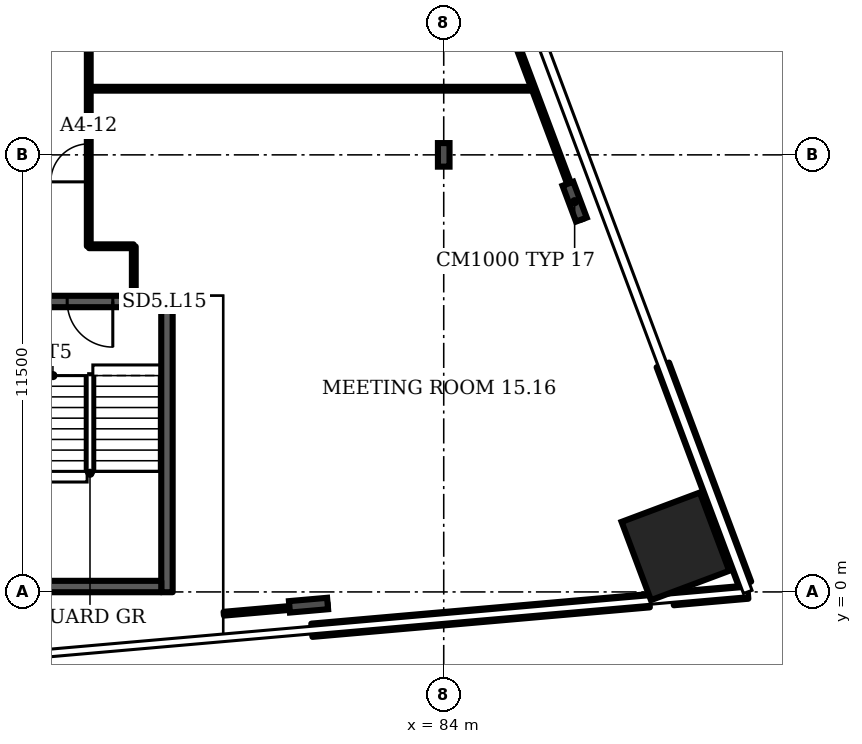
"""IFC4 building model, lengths in metres.
Left out: names, types, materials, properties, quantities, classifications, styles, units other than length and angle.
Written with IfcOpenShell. Run it as: python <this file> out.ifc"""

import sys

from ifc_helpers import new_model, si_unit, direction, frame, frame_2d, origin, origin_2d, place, context, subcontext, project, spatial, rectangle, i_section, extrude, element, fill, save


model = new_model("IFC4")
c1 = context("Model", 3, precision=1e-05, world=origin(), true_north=direction((0.0, 1.0)))
c2 = subcontext(c1, "Body", "Model", "MODEL_VIEW")
j1 = project(units=[si_unit("LENGTHUNIT", "METRE"), si_unit("PLANEANGLEUNIT", "RADIAN")], contexts=[c1])
p1 = place(None, origin())
s1 = spatial("IfcSite", under=j1, at=p1, CompositionType="ELEMENT")
p2 = place(p1, origin())
s2 = spatial("IfcBuilding", under=s1, at=p2, CompositionType="ELEMENT")
p3 = place(p2, frame((0.0, 0.0, 73.9)))
s3 = spatial("IfcBuildingStorey", under=s2, at=p3, CompositionType="ELEMENT", Elevation=73.9)
p4 = place(p3, frame((90.096, 1.2, 0.0), z_axis=(0.0, 0.0, 1.0), x_axis=(-0.351123, 0.936328, 0.0)))
e1 = element("IfcColumn", 1, at=p4, inside=s3, PredefinedType="COLUMN", context=c2, shape_type="SweptSolid", body=[
    extrude(rectangle(XDim=2.2, YDim=2.2, at=origin_2d()), origin(), (0.0, 0.0, 1.0), 3.6),
])
for number, where, z_axis, x_axis in (
    (2, (80.442, -0.349, 0.0), (0.0, 0.0, 1.0), (0.087, -0.996, 0.0)),
    (3, (87.445, 10.268, 0.0), (0.0, 0.0, 1.0), (0.936, 0.351, 0.0)),
):
    element("IfcColumn", number, at=place(p3, frame(where, z_axis=z_axis, x_axis=x_axis)), inside=s3, PredefinedType="COLUMN", context=c2, shape_type="SweptSolid", body=[
        extrude(i_section(OverallWidth=0.302, OverallDepth=1.008, WebThickness=0.021, FlangeThickness=0.04, FilletRadius=0.03, at=origin_2d()), origin(), (0.0, 0.0, 1.0), 3.6),
    ])
p5 = place(p3, frame((84.0, 11.5, 0.0), z_axis=(0.0, 0.0, 1.0), x_axis=(1.0, 0.0, 0.0)))
e4 = element("IfcColumn", 4, at=p5, inside=s3, PredefinedType="COLUMN", context=c2, shape_type="SweptSolid", body=[
    extrude(i_section(OverallWidth=0.305, OverallDepth=0.62, WebThickness=0.021, FlangeThickness=0.04, FilletRadius=0.027, at=origin_2d()), origin(), (0.0, 0.0, 1.0), 3.6),
])
p6 = place(p3, frame((80.53, -1.009, 0.0), z_axis=(0.0, 0.0, 1.0), x_axis=(0.996198, 0.087169, 0.0)))
e5 = element("IfcWall", 5, at=p6, inside=s3, PredefinedType="SOLIDWALL", context=c2, shape_type="SweptSolid", body=[
    extrude(rectangle(XDim=8.912, YDim=0.35, at=frame_2d((4.456, 0.0))), origin(), (0.0, 0.0, 1.0), 1.0),
])
p7 = place(p3, frame((90.039, -0.177, 0.0), z_axis=(0.0, 0.0, 1.0), x_axis=(0.996193, 0.08717, 0.0)))
e6 = element("IfcWall", 6, at=p7, inside=s3, PredefinedType="SOLIDWALL", context=c2, shape_type="SweptSolid", body=[
    extrude(rectangle(XDim=1.969, YDim=0.35, at=frame_2d((0.984, 0.0))), origin(), (0.0, 0.0, 1.0), 1.0),
])
p8 = place(p3, frame((91.926, 0.211, 0.0), z_axis=(0.0, 0.0, 1.0), x_axis=(-0.351118, 0.936328, 0.0)))
e7 = element("IfcWall", 7, at=p8, inside=s3, PredefinedType="SOLIDWALL", context=c2, shape_type="SweptSolid", body=[
    extrude(rectangle(XDim=6.154, YDim=0.35, at=frame_2d((3.077, 0.0))), origin(), (0.0, 0.0, 1.0), 1.0),
])
p9 = place(p3, frame((72.518, 7.642, 0.0), z_axis=(0.0, 0.0, 1.0), x_axis=(1.0, 0.0, 0.0)))
e8 = element("IfcWall", 8, at=p9, inside=s3, PredefinedType="SHEAR", context=c2, shape_type="SweptSolid", body=[
    extrude(rectangle(XDim=4.35, YDim=0.3, at=frame_2d((2.175, 0.0))), origin(), (0.0, 0.0, 1.0), 3.2),
])
p10 = place(p9, frame((1.575, 0.0, 0.0)))
e9 = element("IfcOpeningElement", 9, at=p10, cuts=e8, PredefinedType="OPENING", context=c2, shape_type="SweptSolid", body=[
    extrude(rectangle(XDim=1.2, YDim=2.1, at=frame_2d((0.6, 1.05))), frame((0.0, 0.16, 0.0), z_axis=(0.0, -1.0, 0.0), x_axis=(1.0, 0.0, 0.0)), (0.0, 0.0, 1.0), 0.32),
])
p11 = place(p3, frame((74.66, 9.095, 0.0), z_axis=(0.0, 0.0, 1.0), x_axis=(0.0, 1.0, 0.0)))
e10 = element("IfcWall", 10, at=p11, inside=s3, PredefinedType="PARTITIONING", context=c2, shape_type="SweptSolid", body=[
    extrude(rectangle(XDim=14.23, YDim=0.1, at=frame_2d((7.115, 0.0))), origin(), (0.0, 0.0, 1.0), 3.2),
])
p12 = place(p11, frame((1.695, 0.0, 0.0)))
e11 = element("IfcOpeningElement", 11, at=p12, cuts=e10, PredefinedType="OPENING", context=c2, shape_type="SweptSolid", body=[
    extrude(rectangle(XDim=1.0, YDim=2.1, at=frame_2d((0.5, 1.05))), frame((0.0, 0.06, 0.0), z_axis=(0.0, -1.0, 0.0), x_axis=(1.0, 0.0, 0.0)), (0.0, 0.0, 1.0), 0.12),
])
p13 = place(p11, frame((7.965, 0.0, 0.0)))
e12 = element("IfcOpeningElement", 12, at=p13, cuts=e10, PredefinedType="OPENING", context=c2, shape_type="SweptSolid", body=[
    extrude(rectangle(XDim=1.0, YDim=2.1, at=frame_2d((0.5, 1.05))), frame((0.0, 0.06, 0.0), z_axis=(0.0, -1.0, 0.0), x_axis=(1.0, 0.0, 0.0)), (0.0, 0.0, 1.0), 0.12),
])
p14 = place(p3, frame((74.665, 9.095, 0.0), z_axis=(0.0, 0.0, 1.0), x_axis=(1.0, 0.0, 0.0)))
e13 = element("IfcWall", 13, at=p14, inside=s3, PredefinedType="PARTITIONING", context=c2, shape_type="SweptSolid", body=[
    extrude(rectangle(XDim=1.175, YDim=0.1, at=frame_2d((0.587, 0.0))), origin(), (0.0, 0.0, 1.0), 3.2),
])
p15 = place(p3, frame((74.665, 13.24, 0.0), z_axis=(0.0, 0.0, 1.0), x_axis=(1.0, 0.0, 0.0)))
e14 = element("IfcWall", 14, at=p15, inside=s3, PredefinedType="PARTITIONING", context=c2, shape_type="SweptSolid", body=[
    extrude(rectangle(XDim=11.7, YDim=0.1, at=frame_2d((5.85, 0.0))), origin(), (0.0, 0.0, 1.0), 3.2),
])
p16 = place(p3, frame((75.845, 7.812, 0.0), z_axis=(0.0, 0.0, 1.0), x_axis=(0.0, 1.0, 0.0)))
e15 = element("IfcWall", 15, at=p16, inside=s3, PredefinedType="PARTITIONING", context=c2, shape_type="SweptSolid", body=[
    extrude(rectangle(XDim=1.278, YDim=0.1, at=frame_2d((0.639, 0.0))), origin(), (0.0, 0.0, 1.0), 3.2),
])
p17 = place(p3, frame((78.212, -0.573, 0.0), z_axis=(0.0, 0.0, 1.0), x_axis=(0.996224, 0.086779, 0.0)))
e16 = element("IfcWall", 16, at=p17, inside=s3, PredefinedType="PARTITIONING", context=c2, shape_type="SweptSolid", body=[
    extrude(rectangle(XDim=2.743, YDim=0.1, at=frame_2d((1.372, 0.0))), origin(), (0.0, 0.0, 1.0), 2.58),
])
p18 = place(p3, frame((87.65, 9.81, 0.0), z_axis=(0.0, 0.0, 1.0), x_axis=(-0.35104, 0.936357, 0.0)))
e17 = element("IfcWall", 17, at=p18, inside=s3, PredefinedType="PARTITIONING", context=c2, shape_type="SweptSolid", body=[
    extrude(rectangle(XDim=12.997, YDim=0.1, at=frame_2d((6.499, 0.0))), origin(), (0.0, 0.0, 1.0), 2.58),
])
p19 = place(p3, frame((76.718, -0.008, 0.0), z_axis=(0.0, 0.0, 1.0), x_axis=(0.0, 1.0, 0.0)))
e18 = element("IfcWall", 18, at=p19, inside=s3, PredefinedType="SHEAR", context=c2, shape_type="SweptSolid", body=[
    extrude(rectangle(XDim=7.5, YDim=0.3, at=frame_2d((3.75, 0.0))), origin(), (0.0, 0.0, 1.0), 3.2),
])
p20 = place(p3, frame((72.817, 0.142, 0.0), z_axis=(0.0, 0.0, 1.0), x_axis=(1.0, 0.0, 0.0)))
e19 = element("IfcWall", 19, at=p20, inside=s3, PredefinedType="SHEAR", context=c2, shape_type="SweptSolid", body=[
    extrude(rectangle(XDim=3.75, YDim=0.3, at=frame_2d((1.875, 0.0))), origin(), (0.0, 0.0, 1.0), 3.2),
])
p21 = place(p10, origin())
e20 = element("IfcDoor", 20, at=p21, inside=s3, OperationType="SINGLE_SWING_RIGHT", PredefinedType="DOOR", context=c2, shape_type="SweptSolid", body=[
    extrude(rectangle(XDim=1.2, YDim=2.1, at=frame_2d((0.6, 1.05))), frame((0.0, 0.025, 0.0), z_axis=(0.0, -1.0, 0.0), x_axis=(1.0, 0.0, 0.0)), (0.0, 0.0, 1.0), 0.05),
])
fill(e9, e20)
p22 = place(p12, origin())
e21 = element("IfcDoor", 21, at=p22, inside=s3, OperationType="SINGLE_SWING_LEFT", PredefinedType="DOOR", context=c2, shape_type="SweptSolid", body=[
    extrude(rectangle(XDim=1.0, YDim=2.1, at=frame_2d((0.5, 1.05))), frame((0.0, 0.025, 0.0), z_axis=(0.0, -1.0, 0.0), x_axis=(1.0, 0.0, 0.0)), (0.0, 0.0, 1.0), 0.05),
])
fill(e11, e21)
save(model, sys.argv[1])
